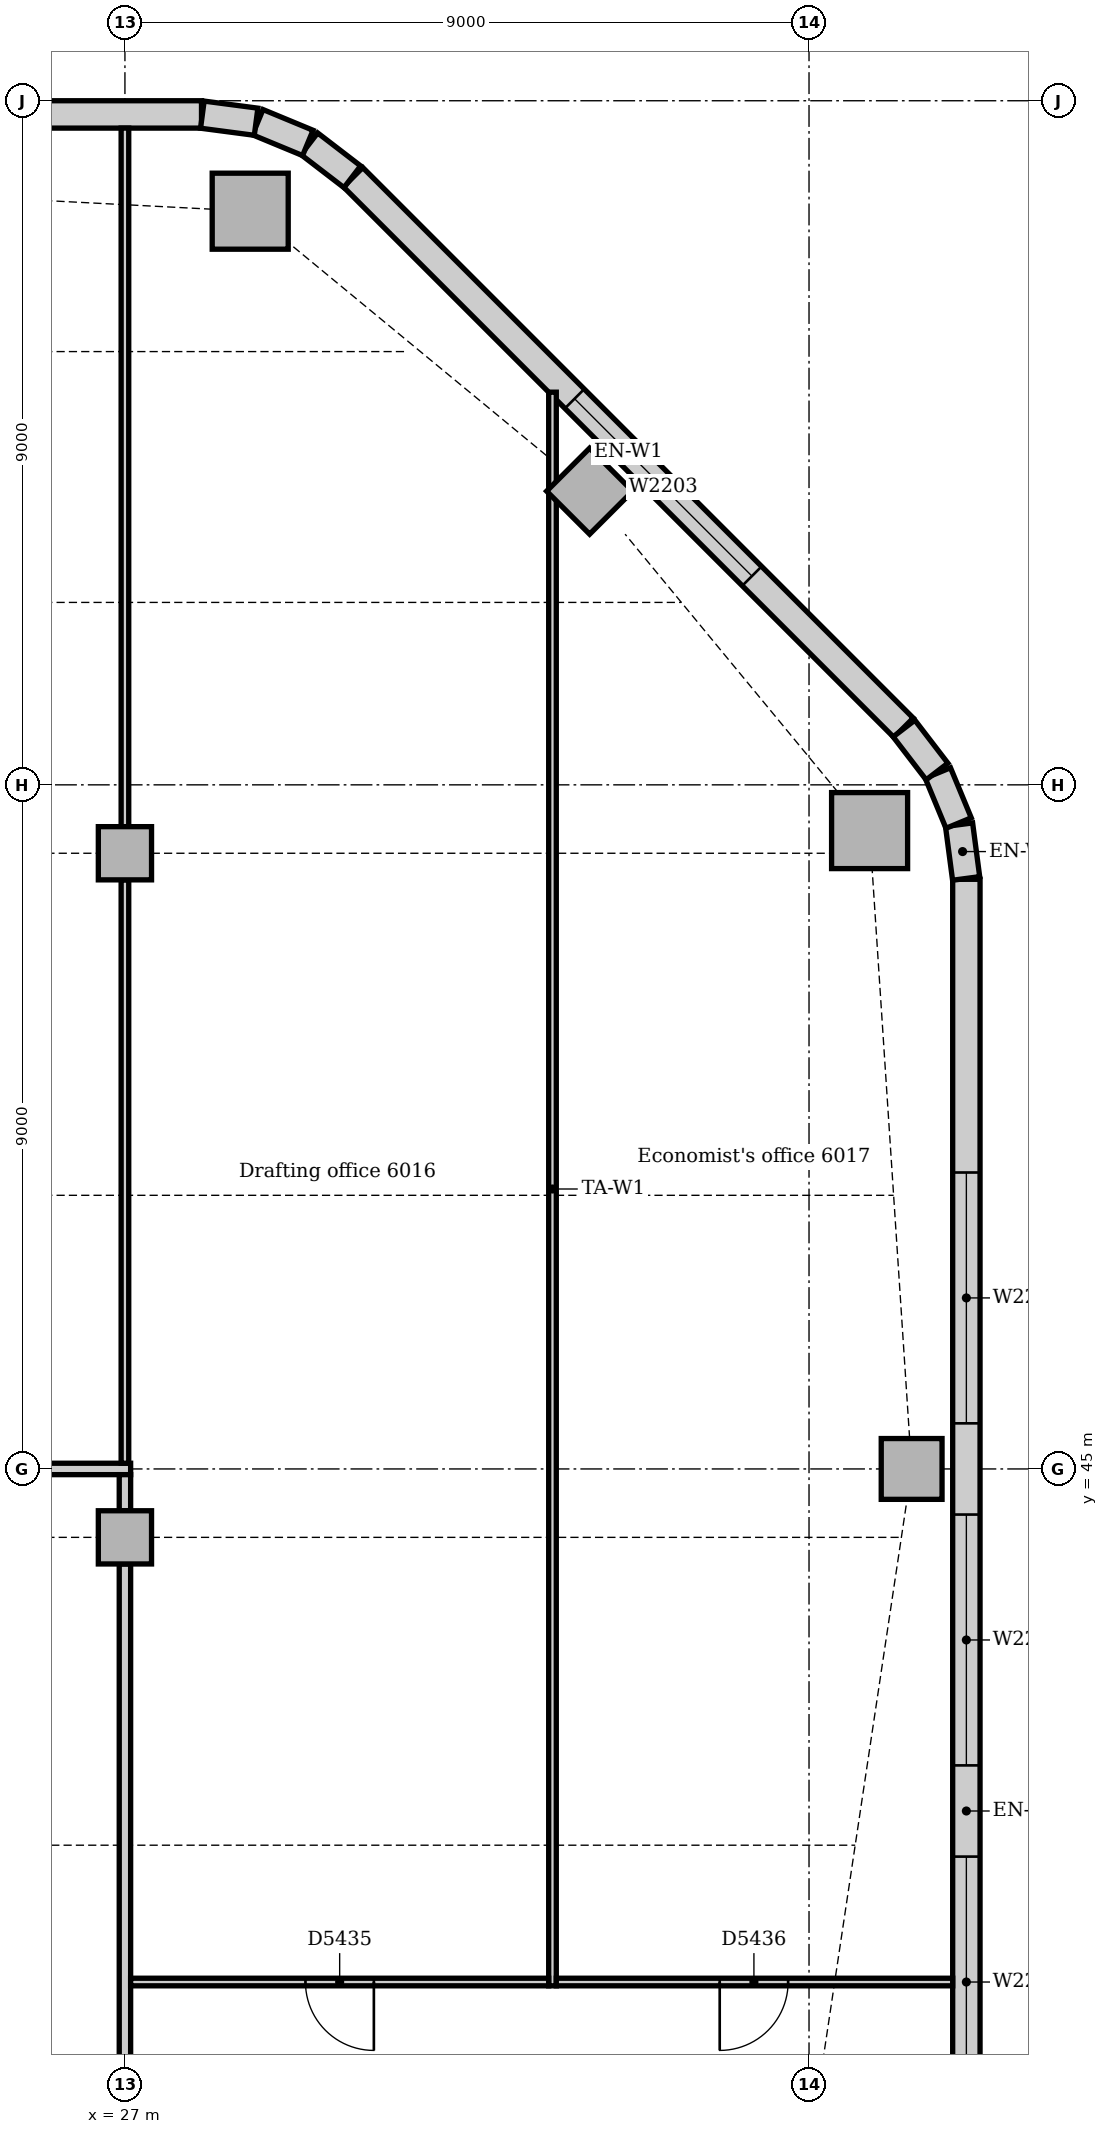
"""IFC4 building model, lengths in metres.
Left out: names, types, materials, properties, quantities, classifications, styles, units other than length and angle.
Written with IfcOpenShell. Run it as: python <this file> out.ifc"""

import sys

from ifc_helpers import new_model, si_unit, direction, frame, frame_2d, origin, origin_2d, place, context, subcontext, project, spatial, rectangle, extrude, element, fill, save


model = new_model("IFC4")
c1 = context("Model", 3, precision=1e-05, world=origin(), true_north=direction((0.0, 1.0)))
c2 = subcontext(c1, "Body", "Model", "MODEL_VIEW")
j1 = project(units=[si_unit("LENGTHUNIT", "METRE"), si_unit("PLANEANGLEUNIT", "RADIAN")], contexts=[c1])
p1 = place(None, origin())
s1 = spatial("IfcSite", under=j1, at=p1, CompositionType="ELEMENT")
p2 = place(p1, origin())
s2 = spatial("IfcBuilding", under=s1, at=p2, CompositionType="ELEMENT")
p3 = place(p2, frame((0.0, 0.0, 251.0)))
s3 = spatial("IfcBuildingStorey", under=s2, at=p3, CompositionType="ELEMENT", Elevation=251.0)
for number, where, z_axis, x_axis in (
    (1, (36.797, 53.398, 0.0), (0.0, 0.0, 1.0), (1.0, 0.0, 0.0)),
    (2, (28.648, 61.547, 0.0), (0.0, 0.0, 1.0), (1.0, 0.0, 0.0)),
):
    element("IfcColumn", number, at=place(p3, frame(where, z_axis=z_axis, x_axis=x_axis)), inside=s3, PredefinedType="COLUMN", context=c2, shape_type="SweptSolid", body=[
        extrude(rectangle(XDim=1.0, YDim=1.0, at=origin_2d()), origin(), (0.0, 0.0, 1.0), 3.85),
    ])
for number, where, z_axis, x_axis in (
    (3, (37.35, 45.0, 0.0), (0.0, 0.0, 1.0), (1.0, 0.0, 0.0)),
    (4, (33.114, 57.864, 0.0), (0.0, 0.0, 1.0), (0.707, 0.707, 0.0)),
):
    element("IfcColumn", number, at=place(p3, frame(where, z_axis=z_axis, x_axis=x_axis)), inside=s3, PredefinedType="COLUMN", context=c2, shape_type="SweptSolid", body=[
        extrude(rectangle(XDim=0.8, YDim=0.8, at=origin_2d()), origin(), (0.0, 0.0, 1.0), 3.85),
    ])
for number, where, z_axis, x_axis in (
    (5, (27.0, 44.1, 0.0), (0.0, 0.0, 1.0), (1.0, 0.0, 0.0)),
    (6, (27.0, 53.1, 0.0), (0.0, 0.0, 1.0), (1.0, 0.0, 0.0)),
):
    element("IfcColumn", number, at=place(p3, frame(where, z_axis=z_axis, x_axis=x_axis)), inside=s3, PredefinedType="COLUMN", context=c2, shape_type="SweptSolid", body=[
        extrude(rectangle(XDim=0.7, YDim=0.7, at=origin_2d()), origin(), (0.0, 0.0, 1.0), 3.85),
    ])
p4 = place(p3, frame((38.07, 28.243, 0.0), z_axis=(0.0, 0.0, 1.0), x_axis=(0.0, 1.0, 0.0)))
e7 = element("IfcWall", 7, at=p4, inside=s3, PredefinedType="STANDARD", context=c2, shape_type="SweptSolid", body=[
    extrude(rectangle(XDim=24.515, YDim=0.36, at=frame_2d((12.257, 0.0))), origin(), (0.0, 0.0, 1.0), 3.85),
])
p5 = place(p4, frame((3.857, 0.0, 0.9)))
e8 = element("IfcOpeningElement", 8, at=p5, cuts=e7, PredefinedType="OPENING", context=c2, shape_type="SweptSolid", body=[
    extrude(rectangle(XDim=3.3, YDim=1.6, at=frame_2d((1.65, 0.8))), frame((0.0, 0.19, 0.0), z_axis=(0.0, -1.0, 0.0), x_axis=(1.0, 0.0, 0.0)), (0.0, 0.0, 1.0), 0.38),
])
p6 = place(p4, frame((8.357, 0.0, 0.9)))
e9 = element("IfcOpeningElement", 9, at=p6, cuts=e7, PredefinedType="OPENING", context=c2, shape_type="SweptSolid", body=[
    extrude(rectangle(XDim=3.3, YDim=1.6, at=frame_2d((1.65, 0.8))), frame((0.0, 0.19, 0.0), z_axis=(0.0, -1.0, 0.0), x_axis=(1.0, 0.0, 0.0)), (0.0, 0.0, 1.0), 0.38),
])
p7 = place(p4, frame((12.857, 0.0, 0.9)))
e10 = element("IfcOpeningElement", 10, at=p7, cuts=e7, PredefinedType="OPENING", context=c2, shape_type="SweptSolid", body=[
    extrude(rectangle(XDim=3.3, YDim=1.6, at=frame_2d((1.65, 0.8))), frame((0.0, 0.19, 0.0), z_axis=(0.0, -1.0, 0.0), x_axis=(1.0, 0.0, 0.0)), (0.0, 0.0, 1.0), 0.38),
])
p8 = place(p4, frame((17.357, 0.0, 0.9)))
e11 = element("IfcOpeningElement", 11, at=p8, cuts=e7, PredefinedType="OPENING", context=c2, shape_type="SweptSolid", body=[
    extrude(rectangle(XDim=3.3, YDim=1.6, at=frame_2d((1.65, 0.8))), frame((0.0, 0.19, 0.0), z_axis=(0.0, -1.0, 0.0), x_axis=(1.0, 0.0, 0.0)), (0.0, 0.0, 1.0), 0.38),
])
p9 = place(p3, frame((37.244, 54.751, 0.0), z_axis=(0.0, 0.0, 1.0), x_axis=(-0.707106781187, 0.707106781187, 0.0)))
e12 = element("IfcWall", 12, at=p9, inside=s3, PredefinedType="STANDARD", context=c2, shape_type="SweptSolid", body=[
    extrude(rectangle(XDim=10.243, YDim=0.36, at=frame_2d((5.121, 0.0))), origin(), (0.0, 0.0, 1.0), 3.85),
])
p10 = place(p9, frame((2.821, 0.0, 0.9)))
e13 = element("IfcOpeningElement", 13, at=p10, cuts=e12, PredefinedType="OPENING", context=c2, shape_type="SweptSolid", body=[
    extrude(rectangle(XDim=3.3, YDim=1.6, at=frame_2d((1.65, 0.8))), frame((0.0, 0.19, 0.0), z_axis=(0.0, -1.0, 0.0), x_axis=(1.0, 0.0, 0.0)), (0.0, 0.0, 1.0), 0.38),
])
p11 = place(p3, frame((28.007, 62.82, 0.0), z_axis=(0.0, 0.0, 1.0), x_axis=(-1.0, 0.0, 0.0)))
e14 = element("IfcWall", 14, at=p11, inside=s3, PredefinedType="STANDARD", context=c2, shape_type="SweptSolid", body=[
    extrude(rectangle(XDim=23.765, YDim=0.36, at=frame_2d((11.882, 0.0))), origin(), (0.0, 0.0, 1.0), 3.85),
])
p12 = place(p11, frame((3.482, 0.0, 0.9)))
e15 = element("IfcOpeningElement", 15, at=p12, cuts=e14, PredefinedType="OPENING", context=c2, shape_type="SweptSolid", body=[
    extrude(rectangle(XDim=3.3, YDim=1.6, at=frame_2d((1.65, 0.8))), frame((0.0, 0.19, 0.0), z_axis=(0.0, -1.0, 0.0), x_axis=(1.0, 0.0, 0.0)), (0.0, 0.0, 1.0), 0.38),
])
p13 = place(p11, frame((7.982, 0.0, 0.9)))
e16 = element("IfcOpeningElement", 16, at=p13, cuts=e14, PredefinedType="OPENING", context=c2, shape_type="SweptSolid", body=[
    extrude(rectangle(XDim=3.3, YDim=1.6, at=frame_2d((1.65, 0.8))), frame((0.0, 0.19, 0.0), z_axis=(0.0, -1.0, 0.0), x_axis=(1.0, 0.0, 0.0)), (0.0, 0.0, 1.0), 0.38),
])
p14 = place(p11, frame((12.482, 0.0, 0.9)))
e17 = element("IfcOpeningElement", 17, at=p14, cuts=e14, PredefinedType="OPENING", context=c2, shape_type="SweptSolid", body=[
    extrude(rectangle(XDim=3.3, YDim=1.6, at=frame_2d((1.65, 0.8))), frame((0.0, 0.19, 0.0), z_axis=(0.0, -1.0, 0.0), x_axis=(1.0, 0.0, 0.0)), (0.0, 0.0, 1.0), 0.38),
])
p15 = place(p11, frame((16.982, 0.0, 0.9)))
e18 = element("IfcOpeningElement", 18, at=p15, cuts=e14, PredefinedType="OPENING", context=c2, shape_type="SweptSolid", body=[
    extrude(rectangle(XDim=3.3, YDim=1.6, at=frame_2d((1.65, 0.8))), frame((0.0, 0.19, 0.0), z_axis=(0.0, -1.0, 0.0), x_axis=(1.0, 0.0, 0.0)), (0.0, 0.0, 1.0), 0.38),
])
for number, where, z_axis, x_axis in (
    (19, (38.067, 52.769, 0.0), (0.0, 0.0, 1.0), (-0.131, 0.991, 0.0)),
    (20, (37.968, 53.497, 0.0), (0.0, 0.0, 1.0), (-0.383, 0.924, 0.0)),
):
    element("IfcWall", number, at=place(p3, frame(where, z_axis=z_axis, x_axis=x_axis)), inside=s3, PredefinedType="STANDARD", context=c2, shape_type="SweptSolid", body=[
        extrude(rectangle(XDim=0.713, YDim=0.36, at=frame_2d((0.356, 0.0))), origin(), (0.0, 0.0, 1.0), 3.85),
    ])
for number, where, z_axis, x_axis in (
    (21, (37.684, 54.175, 0.0), (0.0, 0.0, 1.0), (-0.609, 0.793, 0.0)),
    (22, (29.991, 62.0, 0.0), (0.0, 0.0, 1.0), (-0.793, 0.609, 0.0)),
):
    element("IfcWall", number, at=place(p3, frame(where, z_axis=z_axis, x_axis=x_axis)), inside=s3, PredefinedType="STANDARD", context=c2, shape_type="SweptSolid", body=[
        extrude(rectangle(XDim=0.713, YDim=0.36, at=frame_2d((0.357, 0.0))), origin(), (0.0, 0.0, 1.0), 3.85),
    ])
for number, where, z_axis, x_axis in (
    (23, (29.406, 62.445, 0.0), (0.0, 0.0, 1.0), (-0.924, 0.383, 0.0)),
    (24, (28.726, 62.724, 0.0), (0.0, 0.0, 1.0), (-0.991, 0.131, 0.0)),
):
    element("IfcWall", number, at=place(p3, frame(where, z_axis=z_axis, x_axis=x_axis)), inside=s3, PredefinedType="STANDARD", context=c2, shape_type="SweptSolid", body=[
        extrude(rectangle(XDim=0.713, YDim=0.36, at=frame_2d((0.356, 0.0))), origin(), (0.0, 0.0, 1.0), 3.85),
    ])
p16 = place(p3, frame((0.36, 45.0, 0.0), z_axis=(0.0, 0.0, 1.0), x_axis=(1.0, 0.0, 0.0)))
e25 = element("IfcWall", 25, at=p16, inside=s3, PredefinedType="PARTITIONING", context=c2, shape_type="SweptSolid", body=[
    extrude(rectangle(XDim=26.715, YDim=0.15, at=frame_2d((13.357, 0.0))), origin(), (0.0, 0.0, 1.0), 3.85),
])
p17 = place(p16, frame((9.0, 0.0, 0.0)))
e26 = element("IfcOpeningElement", 26, at=p17, cuts=e25, PredefinedType="OPENING", context=c2, shape_type="SweptSolid", body=[
    extrude(rectangle(XDim=1.0, YDim=2.1, at=frame_2d((0.5, 1.05))), frame((0.0, 0.085, 0.0), z_axis=(0.0, -1.0, 0.0), x_axis=(1.0, 0.0, 0.0)), (0.0, 0.0, 1.0), 0.17),
])
p18 = place(p16, frame((21.64, 0.0, 0.0)))
e27 = element("IfcOpeningElement", 27, at=p18, cuts=e25, PredefinedType="OPENING", context=c2, shape_type="SweptSolid", body=[
    extrude(rectangle(XDim=0.9, YDim=2.1, at=frame_2d((0.45, 1.05))), frame((0.0, 0.085, 0.0), z_axis=(0.0, -1.0, 0.0), x_axis=(1.0, 0.0, 0.0)), (0.0, 0.0, 1.0), 0.17),
])
p19 = place(p3, frame((27.0, 36.35, 0.0), z_axis=(0.0, 0.0, 1.0), x_axis=(0.0, 1.0, 0.0)))
e28 = element("IfcWall", 28, at=p19, inside=s3, PredefinedType="PARTITIONING", context=c2, shape_type="SweptSolid", body=[
    extrude(rectangle(XDim=7.4, YDim=0.15, at=frame_2d((3.7, 0.0))), origin(), (0.0, 0.0, 1.0), 3.4),
])
p20 = place(p3, frame((27.0, 44.45, 0.0), z_axis=(0.0, 0.0, 1.0), x_axis=(0.0, 1.0, 0.0)))
e29 = element("IfcWall", 29, at=p20, inside=s3, PredefinedType="PARTITIONING", context=c2, shape_type="SweptSolid", body=[
    extrude(rectangle(XDim=0.475, YDim=0.15, at=frame_2d((0.237, 0.0))), origin(), (0.0, 0.0, 1.0), 3.85),
])
p21 = place(p3, frame((32.625, 38.2, 0.0), z_axis=(0.0, 0.0, 1.0), x_axis=(0.0, 1.0, 0.0)))
e30 = element("IfcWall", 30, at=p21, inside=s3, PredefinedType="PARTITIONING", context=c2, shape_type="SweptSolid", body=[
    extrude(rectangle(XDim=20.966, YDim=0.1, at=frame_2d((10.483, 0.0))), origin(), (0.0, 0.0, 1.0), 3.85),
])
p22 = place(p3, frame((27.0, 45.075, 0.0), z_axis=(0.0, 0.0, 1.0), x_axis=(0.0, 1.0, 0.0)))
e31 = element("IfcWall", 31, at=p22, inside=s3, PredefinedType="PARTITIONING", context=c2, shape_type="SweptSolid", body=[
    extrude(rectangle(XDim=7.675, YDim=0.1, at=frame_2d((3.837, 0.0))), origin(), (0.0, 0.0, 1.0), 3.4),
])
p23 = place(p3, frame((27.0, 53.45, 0.0), z_axis=(0.0, 0.0, 1.0), x_axis=(0.0, 1.0, 0.0)))
e32 = element("IfcWall", 32, at=p23, inside=s3, PredefinedType="PARTITIONING", context=c2, shape_type="SweptSolid", body=[
    extrude(rectangle(XDim=9.19, YDim=0.1, at=frame_2d((4.595, 0.0))), origin(), (0.0, 0.0, 1.0), 3.4),
])
p24 = place(p3, frame((27.075, 38.25, 0.0), z_axis=(0.0, 0.0, 1.0), x_axis=(1.0, 0.0, 0.0)))
e33 = element("IfcWall", 33, at=p24, inside=s3, PredefinedType="PARTITIONING", context=c2, shape_type="SweptSolid", body=[
    extrude(rectangle(XDim=5.5, YDim=0.1, at=frame_2d((2.75, 0.0))), origin(), (0.0, 0.0, 1.0), 3.85),
])
p25 = place(p24, frame((2.3, 0.0, 0.0)))
e34 = element("IfcOpeningElement", 34, at=p25, cuts=e33, PredefinedType="OPENING", context=c2, shape_type="SweptSolid", body=[
    extrude(rectangle(XDim=0.9, YDim=2.1, at=frame_2d((0.45, 1.05))), frame((0.0, 0.06, 0.0), z_axis=(0.0, -1.0, 0.0), x_axis=(1.0, 0.0, 0.0)), (0.0, 0.0, 1.0), 0.12),
])
p26 = place(p3, frame((32.675, 38.25, 0.0), z_axis=(0.0, 0.0, 1.0), x_axis=(1.0, 0.0, 0.0)))
e35 = element("IfcWall", 35, at=p26, inside=s3, PredefinedType="PARTITIONING", context=c2, shape_type="SweptSolid", body=[
    extrude(rectangle(XDim=5.215, YDim=0.1, at=frame_2d((2.607, 0.0))), origin(), (0.0, 0.0, 1.0), 3.85),
])
p27 = place(p26, frame((2.15, 0.0, 0.0)))
e36 = element("IfcOpeningElement", 36, at=p27, cuts=e35, PredefinedType="OPENING", context=c2, shape_type="SweptSolid", body=[
    extrude(rectangle(XDim=0.9, YDim=2.1, at=frame_2d((0.45, 1.05))), frame((0.0, 0.06, 0.0), z_axis=(0.0, -1.0, 0.0), x_axis=(1.0, 0.0, 0.0)), (0.0, 0.0, 1.0), 0.12),
])
p28 = place(p6, origin())
e37 = element("IfcWindow", 37, at=p28, inside=s3, PartitioningType="SINGLE_PANEL", PredefinedType="WINDOW", context=c2, shape_type="SweptSolid", body=[
    extrude(rectangle(XDim=3.3, YDim=1.6, at=frame_2d((1.65, 0.8))), frame((0.0, 0.13, 0.0), z_axis=(0.0, -1.0, 0.0), x_axis=(1.0, 0.0, 0.0)), (0.0, 0.0, 1.0), 0.06),
])
fill(e9, e37)
p29 = place(p7, origin())
e38 = element("IfcWindow", 38, at=p29, inside=s3, PartitioningType="SINGLE_PANEL", PredefinedType="WINDOW", context=c2, shape_type="SweptSolid", body=[
    extrude(rectangle(XDim=3.3, YDim=1.6, at=frame_2d((1.65, 0.8))), frame((0.0, 0.13, 0.0), z_axis=(0.0, -1.0, 0.0), x_axis=(1.0, 0.0, 0.0)), (0.0, 0.0, 1.0), 0.06),
])
fill(e10, e38)
p30 = place(p8, origin())
e39 = element("IfcWindow", 39, at=p30, inside=s3, PartitioningType="SINGLE_PANEL", PredefinedType="WINDOW", context=c2, shape_type="SweptSolid", body=[
    extrude(rectangle(XDim=3.3, YDim=1.6, at=frame_2d((1.65, 0.8))), frame((0.0, 0.13, 0.0), z_axis=(0.0, -1.0, 0.0), x_axis=(1.0, 0.0, 0.0)), (0.0, 0.0, 1.0), 0.06),
])
fill(e11, e39)
p31 = place(p10, origin())
e40 = element("IfcWindow", 40, at=p31, inside=s3, PartitioningType="SINGLE_PANEL", PredefinedType="WINDOW", context=c2, shape_type="SweptSolid", body=[
    extrude(rectangle(XDim=3.3, YDim=1.6, at=frame_2d((1.65, 0.8))), frame((0.0, 0.13, 0.0), z_axis=(0.0, -1.0, 0.0), x_axis=(1.0, 0.0, 0.0)), (0.0, 0.0, 1.0), 0.06),
])
fill(e13, e40)
p32 = place(p25, frame((0.9, 0.0, 0.0), z_axis=(0.0, 0.0, 1.0), x_axis=(-1.0, 0.0, 0.0)))
e41 = element("IfcDoor", 41, at=p32, inside=s3, OperationType="SINGLE_SWING_LEFT", PredefinedType="DOOR", context=c2, shape_type="SweptSolid", body=[
    extrude(rectangle(XDim=0.9, YDim=2.1, at=frame_2d((0.45, 1.05))), frame((0.0, 0.025, 0.0), z_axis=(0.0, -1.0, 0.0), x_axis=(1.0, 0.0, 0.0)), (0.0, 0.0, 1.0), 0.05),
])
fill(e34, e41)
p33 = place(p27, frame((0.9, 0.0, 0.0), z_axis=(0.0, 0.0, 1.0), x_axis=(-1.0, 0.0, 0.0)))
e42 = element("IfcDoor", 42, at=p33, inside=s3, OperationType="SINGLE_SWING_RIGHT", PredefinedType="DOOR", context=c2, shape_type="SweptSolid", body=[
    extrude(rectangle(XDim=0.9, YDim=2.1, at=frame_2d((0.45, 1.05))), frame((0.0, 0.025, 0.0), z_axis=(0.0, -1.0, 0.0), x_axis=(1.0, 0.0, 0.0)), (0.0, 0.0, 1.0), 0.05),
])
fill(e36, e42)
save(model, sys.argv[1])
